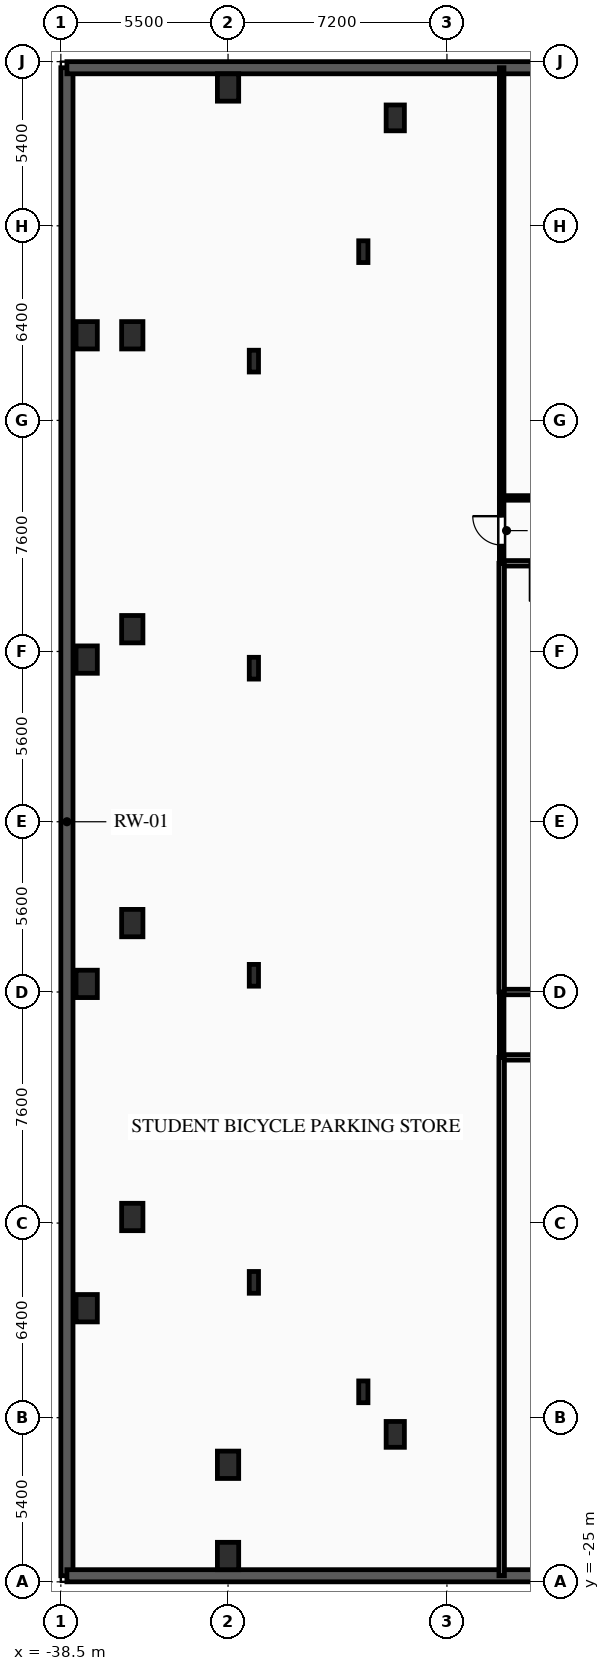
"""IFC4 building model, lengths in metres.
Left out: names, types, materials, properties, quantities, classifications, styles, units other than length and angle.
Written with IfcOpenShell. Run it as: python <this file> out.ifc"""

import sys

from ifc_helpers import new_model, si_unit, direction, frame, frame_2d, origin, origin_2d, place, context, subcontext, project, spatial, rectangle, i_section, extrude, element, fill, save


model = new_model("IFC4")
c1 = context("Model", 3, precision=1e-05, world=origin(), true_north=direction((0.0, 1.0)))
c2 = subcontext(c1, "Body", "Model", "MODEL_VIEW")
j1 = project(units=[si_unit("LENGTHUNIT", "METRE"), si_unit("PLANEANGLEUNIT", "RADIAN")], contexts=[c1])
p1 = place(None, origin())
s1 = spatial("IfcSite", under=j1, at=p1, CompositionType="ELEMENT")
p2 = place(p1, origin())
s2 = spatial("IfcBuilding", under=s1, at=p2, CompositionType="ELEMENT")
p3 = place(p2, frame((0.0, 0.0, -4.5)))
s3 = spatial("IfcBuildingStorey", under=s2, at=p3, CompositionType="ELEMENT", Elevation=-4.5)
for number, where, z_axis, x_axis in (
    (1, (-33.0, -21.15, 0.0), (0.0, 0.0, 1.0), (1.0, 0.0, 0.0)),
    (2, (-33.0, 24.15, 0.0), (0.0, 0.0, 1.0), (1.0, 0.0, 0.0)),
    (3, (-36.15, -13.0, 0.0), (0.0, 0.0, 1.0), (1.0, 0.0, 0.0)),
    (4, (-36.15, -3.333, 0.0), (0.0, 0.0, 1.0), (1.0, 0.0, 0.0)),
    (5, (-36.15, 6.333, 0.0), (0.0, 0.0, 1.0), (1.0, 0.0, 0.0)),
    (6, (-36.15, 16.0, 0.0), (0.0, 0.0, 1.0), (1.0, 0.0, 0.0)),
    (7, (-33.0, -24.15, 0.0), (0.0, 0.0, 1.0), (1.0, 0.0, 0.0)),
    (8, (-37.65, -16.0, 0.0), (0.0, 0.0, 1.0), (1.0, 0.0, 0.0)),
    (9, (-37.65, -5.333, 0.0), (0.0, 0.0, 1.0), (1.0, 0.0, 0.0)),
    (10, (-37.65, 5.333, 0.0), (0.0, 0.0, 1.0), (1.0, 0.0, 0.0)),
    (11, (-37.65, 16.0, 0.0), (0.0, 0.0, 1.0), (1.0, 0.0, 0.0)),
):
    element("IfcColumn", number, at=place(p3, frame(where, z_axis=z_axis, x_axis=x_axis)), inside=s3, PredefinedType="COLUMN", context=c2, shape_type="SweptSolid", body=[
        extrude(rectangle(XDim=0.7, YDim=0.9, at=origin_2d()), origin(), (0.0, 0.0, 1.0), 4.5),
    ])
for number, where, z_axis, x_axis in (
    (12, (-27.5, -20.15, 0.0), (0.0, 0.0, 1.0), (1.0, 0.0, 0.0)),
    (13, (-27.5, 23.15, 0.0), (0.0, 0.0, 1.0), (1.0, 0.0, 0.0)),
):
    element("IfcColumn", number, at=place(p3, frame(where, z_axis=z_axis, x_axis=x_axis)), inside=s3, PredefinedType="PILASTER", context=c2, shape_type="SweptSolid", body=[
        extrude(rectangle(XDim=0.6, YDim=0.85, at=origin_2d()), origin(), (0.0, 0.0, 1.0), 4.5),
    ])
for number, where, z_axis, x_axis in (
    (14, (-28.55, -18.75, 0.0), (0.0, 0.0, 1.0), (1.0, 0.0, 0.0)),
    (15, (-28.55, 18.75, 0.0), (0.0, 0.0, 1.0), (1.0, 0.0, 0.0)),
    (16, (-32.15, 15.15, 0.0), (0.0, 0.0, 1.0), (1.0, 0.0, 0.0)),
    (17, (-32.15, 5.05, 0.0), (0.0, 0.0, 1.0), (1.0, 0.0, 0.0)),
    (18, (-32.15, -5.05, 0.0), (0.0, 0.0, 1.0), (1.0, 0.0, 0.0)),
    (19, (-32.15, -15.15, 0.0), (0.0, 0.0, 1.0), (1.0, 0.0, 0.0)),
):
    element("IfcColumn", number, at=place(p3, frame(where, z_axis=z_axis, x_axis=x_axis)), inside=s3, PredefinedType="COLUMN", context=c2, shape_type="SweptSolid", body=[
        extrude(i_section(OverallWidth=0.304, OverallDepth=0.716, WebThickness=0.021, FlangeThickness=0.04, FilletRadius=0.027, at=origin_2d()), origin(), (0.0, 0.0, 1.0), 4.5),
    ])
p4 = place(p3, frame((-38.3, -24.8, 0.0), z_axis=(0.0, 0.0, 1.0), x_axis=(0.0, 1.0, 0.0)))
e20 = element("IfcWall", 20, at=p4, inside=s3, PredefinedType="SOLIDWALL", context=c2, shape_type="SweptSolid", body=[
    extrude(rectangle(XDim=49.6, YDim=0.4, at=frame_2d((24.8, 0.0))), origin(), (0.0, 0.0, 1.0), 4.16),
])
for number, where, z_axis, x_axis in (
    (21, (-38.3, 24.8, 0.0), (0.0, 0.0, 1.0), (1.0, 0.0, 0.0)),
    (22, (38.3, -24.8, 0.0), (0.0, 0.0, 1.0), (-1.0, 0.0, 0.0)),
):
    element("IfcWall", number, at=place(p3, frame(where, z_axis=z_axis, x_axis=x_axis)), inside=s3, PredefinedType="SOLIDWALL", context=c2, shape_type="SweptSolid", body=[
        extrude(rectangle(XDim=76.6, YDim=0.4, at=frame_2d((38.3, 0.0))), origin(), (0.0, 0.0, 1.0), 4.16),
    ])
p5 = place(p3, frame((-24.0, 8.5, 0.0), z_axis=(0.0, 0.0, 1.0), x_axis=(0.0, 1.0, 0.0)))
e23 = element("IfcWall", 23, at=p5, inside=s3, PredefinedType="PARTITIONING", context=c2, shape_type="SweptSolid", body=[
    extrude(rectangle(XDim=2.15, YDim=0.15, at=frame_2d((1.075, 0.0))), origin(), (0.0, 0.0, 1.0), 4.16),
])
p6 = place(p5, frame((0.6, 0.0, 0.0)))
e24 = element("IfcOpeningElement", 24, at=p6, cuts=e23, PredefinedType="OPENING", context=c2, shape_type="SweptSolid", body=[
    extrude(rectangle(XDim=0.95, YDim=2.1, at=frame_2d((0.475, 1.05))), frame((0.0, 0.085, 0.0), z_axis=(0.0, -1.0, 0.0), x_axis=(1.0, 0.0, 0.0)), (0.0, 0.0, 1.0), 0.17),
])
p7 = place(p3, frame((-24.0, 10.65, 0.0), z_axis=(0.0, 0.0, 1.0), x_axis=(1.0, 0.0, 0.0)))
e25 = element("IfcWall", 25, at=p7, inside=s3, PredefinedType="PARTITIONING", context=c2, shape_type="SweptSolid", body=[
    extrude(rectangle(XDim=24.0, YDim=0.15, at=frame_2d((12.0, 0.0))), origin(), (0.0, 0.0, 1.0), 4.16),
])
p8 = place(p7, frame((19.734, 0.0, 0.0)))
e26 = element("IfcOpeningElement", 26, at=p8, cuts=e25, PredefinedType="OPENING", context=c2, shape_type="SweptSolid", body=[
    extrude(rectangle(XDim=0.95, YDim=2.1, at=frame_2d((0.475, 1.05))), frame((0.0, 0.085, 0.0), z_axis=(0.0, -1.0, 0.0), x_axis=(1.0, 0.0, 0.0)), (0.0, 0.0, 1.0), 0.17),
])
p9 = place(p3, frame((-18.8, 8.5, 0.0), z_axis=(0.0, 0.0, 1.0), x_axis=(-1.0, 0.0, 0.0)))
e27 = element("IfcWall", 27, at=p9, inside=s3, PredefinedType="PARTITIONING", context=c2, shape_type="SweptSolid", body=[
    extrude(rectangle(XDim=5.2, YDim=0.18, at=frame_2d((2.6, 0.0))), origin(), (0.0, 0.0, 1.0), 4.16),
])
p10 = place(p9, frame((3.021, 0.0, 0.0)))
e28 = element("IfcOpeningElement", 28, at=p10, cuts=e27, PredefinedType="OPENING", context=c2, shape_type="SweptSolid", body=[
    extrude(rectangle(XDim=1.25, YDim=2.2, at=frame_2d((0.625, 1.1))), frame((0.0, 0.1, 0.0), z_axis=(0.0, -1.0, 0.0), x_axis=(1.0, 0.0, 0.0)), (0.0, 0.0, 1.0), 0.2),
])
p11 = place(p3, frame((-24.0, -7.75, 0.0), z_axis=(0.0, 0.0, 1.0), x_axis=(0.0, 1.0, 0.0)))
e29 = element("IfcWall", 29, at=p11, inside=s3, PredefinedType="PARTITIONING", context=c2, shape_type="SweptSolid", body=[
    extrude(rectangle(XDim=2.15, YDim=0.15, at=frame_2d((1.075, 0.0))), origin(), (0.0, 0.0, 1.0), 4.16),
])
p12 = place(p3, frame((-3.36, -7.75, 0.0), z_axis=(0.0, 0.0, 1.0), x_axis=(-1.0, 0.0, 0.0)))
e30 = element("IfcWall", 30, at=p12, inside=s3, PredefinedType="PARTITIONING", context=c2, shape_type="SweptSolid", body=[
    extrude(rectangle(XDim=20.64, YDim=0.18, at=frame_2d((10.32, 0.0))), origin(), (0.0, 0.0, 1.0), 4.16),
])
p13 = place(p12, frame((9.695, 0.0, 0.0)))
e31 = element("IfcOpeningElement", 31, at=p13, cuts=e30, PredefinedType="OPENING", context=c2, shape_type="SweptSolid", body=[
    extrude(rectangle(XDim=1.25, YDim=2.2, at=frame_2d((0.625, 1.1))), frame((0.0, 0.1, 0.0), z_axis=(0.0, -1.0, 0.0), x_axis=(1.0, 0.0, 0.0)), (0.0, 0.0, 1.0), 0.2),
])
p14 = place(p3, frame((-24.0, -5.6, 0.0), z_axis=(0.0, 0.0, 1.0), x_axis=(1.0, 0.0, 0.0)))
e32 = element("IfcWall", 32, at=p14, inside=s3, PredefinedType="PARTITIONING", context=c2, shape_type="SweptSolid", body=[
    extrude(rectangle(XDim=5.2, YDim=0.18, at=frame_2d((2.6, 0.0))), origin(), (0.0, 0.0, 1.0), 4.16),
])
p15 = place(p3, frame((-24.0, 24.8, 0.0), z_axis=(0.0, 0.0, 1.0), x_axis=(0.0, -1.0, 0.0)))
e33 = element("IfcWall", 33, at=p15, inside=s3, PredefinedType="PARTITIONING", context=c2, shape_type="SweptSolid", body=[
    extrude(rectangle(XDim=14.15, YDim=0.15, at=frame_2d((7.075, 0.0))), origin(), (0.0, 0.0, 1.0), 4.16),
])
p16 = place(p3, frame((-24.0, -7.75, 0.0), z_axis=(0.0, 0.0, 1.0), x_axis=(0.0, -1.0, 0.0)))
e34 = element("IfcWall", 34, at=p16, inside=s3, PredefinedType="PARTITIONING", context=c2, shape_type="SweptSolid", body=[
    extrude(rectangle(XDim=17.05, YDim=0.18, at=frame_2d((8.525, 0.0))), origin(), (0.0, 0.0, 1.0), 4.16),
])
p17 = place(p3, frame((-24.0, 8.5, 0.0), z_axis=(0.0, 0.0, 1.0), x_axis=(0.0, -1.0, 0.0)))
e35 = element("IfcWall", 35, at=p17, inside=s3, PredefinedType="PARTITIONING", context=c2, shape_type="SweptSolid", body=[
    extrude(rectangle(XDim=14.1, YDim=0.18, at=frame_2d((7.05, 0.0))), origin(), (0.0, 0.0, 1.0), 4.16),
])
p18 = place(p6, origin())
e36 = element("IfcDoor", 36, at=p18, inside=s3, OperationType="SINGLE_SWING_RIGHT", PredefinedType="DOOR", context=c2, shape_type="SweptSolid", body=[
    extrude(rectangle(XDim=0.95, YDim=2.1, at=frame_2d((0.475, 1.05))), frame((0.0, 0.025, 0.0), z_axis=(0.0, -1.0, 0.0), x_axis=(1.0, 0.0, 0.0)), (0.0, 0.0, 1.0), 0.05),
])
fill(e24, e36)
save(model, sys.argv[1])
